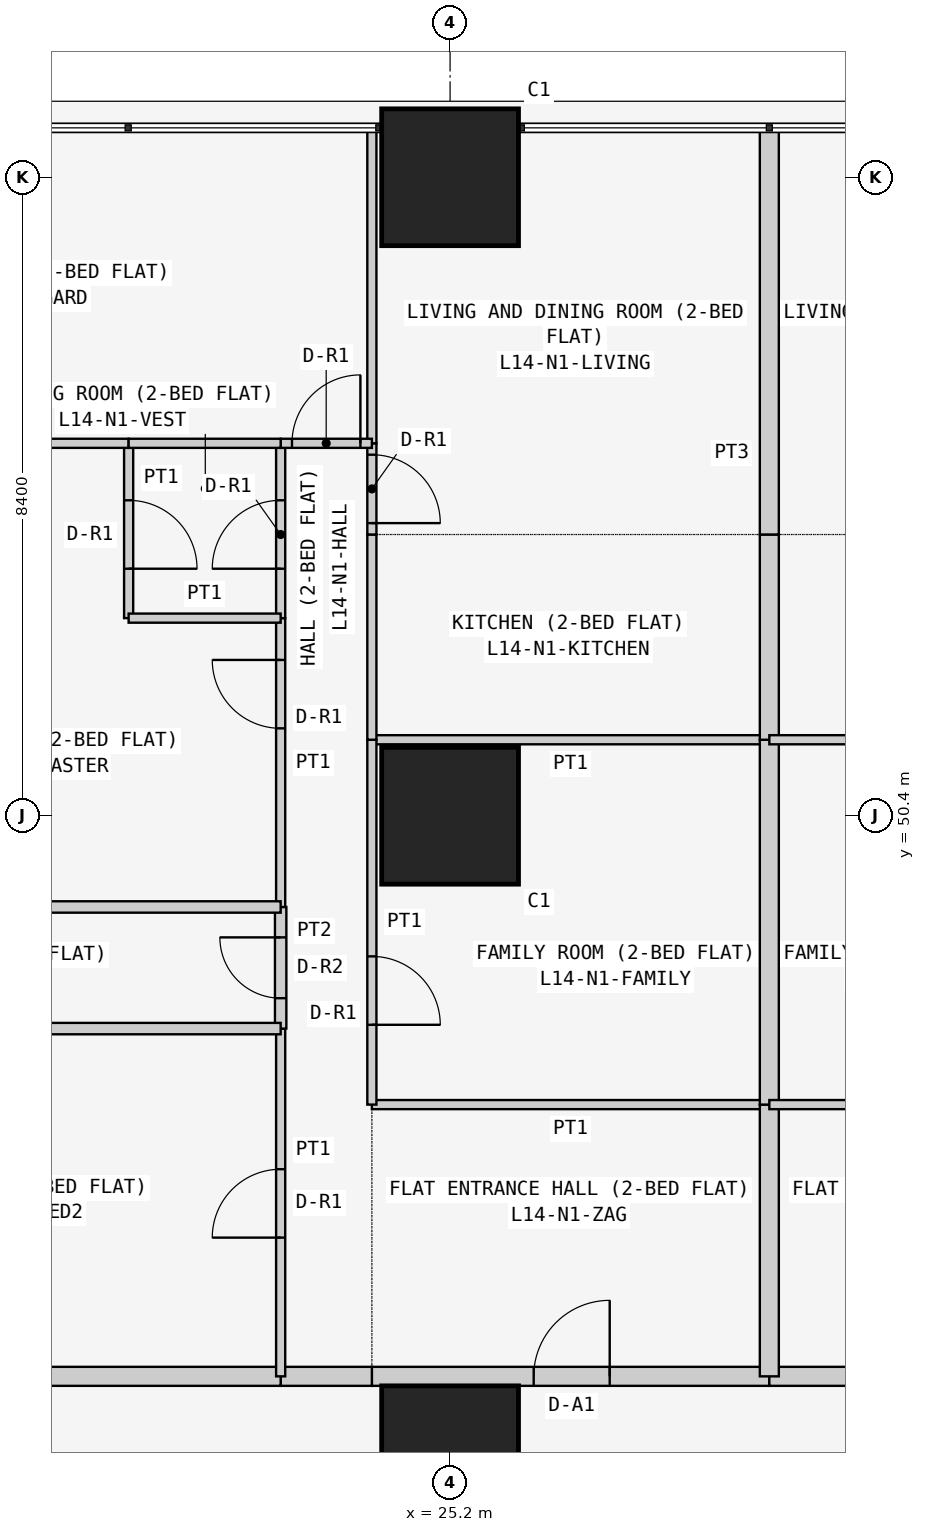
"""IFC4 building model, lengths in metres.
Left out: names, types, materials, properties, quantities, classifications, styles, units other than length and angle.
Written with IfcOpenShell. Run it as: python <this file> out.ifc"""

import sys

from ifc_helpers import new_model, si_unit, direction, frame, frame_2d, origin, origin_2d, place, context, subcontext, project, spatial, rectangle, extrude, element, fill, save


model = new_model("IFC4")
c1 = context("Model", 3, precision=1e-05, world=origin(), true_north=direction((0.0, 1.0)))
c2 = subcontext(c1, "Body", "Model", "MODEL_VIEW")
j1 = project(units=[si_unit("LENGTHUNIT", "METRE"), si_unit("PLANEANGLEUNIT", "RADIAN")], contexts=[c1])
p1 = place(None, origin())
s1 = spatial("IfcSite", under=j1, at=p1, CompositionType="ELEMENT")
p2 = place(p1, origin())
s2 = spatial("IfcBuilding", under=s1, at=p2, CompositionType="ELEMENT")
p3 = place(p2, frame((0.0, 0.0, 59.7)))
s3 = spatial("IfcBuildingStorey", under=s2, at=p3, CompositionType="ELEMENT", Elevation=59.7)
for number, where, z_axis, x_axis in (
    (1, (25.2, 42.0, 0.0), (0.0, 0.0, 1.0), (1.0, 0.0, 0.0)),
    (2, (25.2, 50.4, 0.0), (0.0, 0.0, 1.0), (1.0, 0.0, 0.0)),
    (3, (25.2, 58.8, 0.0), (0.0, 0.0, 1.0), (1.0, 0.0, 0.0)),
):
    element("IfcColumn", number, at=place(p3, frame(where, z_axis=z_axis, x_axis=x_axis)), inside=s3, PredefinedType="COLUMN", context=c2, shape_type="SweptSolid", body=[
        extrude(rectangle(XDim=1.8, YDim=1.8, at=origin_2d()), origin(), (0.0, 0.0, 1.0), 3.6),
    ])
p4 = place(p3, frame((24.171, 43.025, 0.0), z_axis=(0.0, 0.0, 1.0), x_axis=(1.0, 0.0, 0.0)))
e4 = element("IfcWall", 4, at=p4, inside=s3, PredefinedType="PARTITIONING", context=c2, shape_type="SweptSolid", body=[
    extrude(rectangle(XDim=5.229, YDim=0.25, at=frame_2d((2.615, 0.0))), origin(), (0.0, 0.0, 1.0), 3.45),
])
p5 = place(p4, frame((2.129, 0.0, 0.0)))
e5 = element("IfcOpeningElement", 5, at=p5, cuts=e4, PredefinedType="OPENING", context=c2, shape_type="SweptSolid", body=[
    extrude(rectangle(XDim=1.0, YDim=2.1, at=frame_2d((0.5, 1.05))), frame((0.0, 0.135, 0.0), z_axis=(0.0, -1.0, 0.0), x_axis=(1.0, 0.0, 0.0)), (0.0, 0.0, 1.0), 0.27),
])
p6 = place(p3, frame((22.971, 43.025, 0.0), z_axis=(0.0, 0.0, 1.0), x_axis=(1.0, 0.0, 0.0)))
e6 = element("IfcWall", 6, at=p6, inside=s3, PredefinedType="PARTITIONING", context=c2, shape_type="SweptSolid", body=[
    extrude(rectangle(XDim=1.2, YDim=0.25, at=frame_2d((0.6, 0.0))), origin(), (0.0, 0.0, 1.0), 3.45),
])
p7 = place(p3, frame((16.1, 43.025, 0.0), z_axis=(0.0, 0.0, 1.0), x_axis=(1.0, 0.0, 0.0)))
e7 = element("IfcWall", 7, at=p7, inside=s3, PredefinedType="PARTITIONING", context=c2, shape_type="SweptSolid", body=[
    extrude(rectangle(XDim=6.871, YDim=0.25, at=frame_2d((3.436, 0.0))), origin(), (0.0, 0.0, 1.0), 3.45),
])
p8 = place(p3, frame((29.4, 43.025, 0.0), z_axis=(0.0, 0.0, 1.0), x_axis=(1.0, 0.0, 0.0)))
e8 = element("IfcWall", 8, at=p8, inside=s3, PredefinedType="PARTITIONING", context=c2, shape_type="SweptSolid", body=[
    extrude(rectangle(XDim=5.229, YDim=0.25, at=frame_2d((2.615, 0.0))), origin(), (0.0, 0.0, 1.0), 3.45),
])
p9 = place(p8, frame((2.1, 0.0, 0.0)))
e9 = element("IfcOpeningElement", 9, at=p9, cuts=e8, PredefinedType="OPENING", context=c2, shape_type="SweptSolid", body=[
    extrude(rectangle(XDim=1.0, YDim=2.1, at=frame_2d((0.5, 1.05))), frame((0.0, 0.135, 0.0), z_axis=(0.0, -1.0, 0.0), x_axis=(1.0, 0.0, 0.0)), (0.0, 0.0, 1.0), 0.27),
])
p10 = place(p3, frame((29.4, 46.6, 0.0), z_axis=(0.0, 0.0, 1.0), x_axis=(-1.0, 0.0, 0.0)))
e10 = element("IfcWall", 10, at=p10, inside=s3, PredefinedType="PARTITIONING", context=c2, shape_type="SweptSolid", body=[
    extrude(rectangle(XDim=5.229, YDim=0.12, at=frame_2d((2.615, 0.0))), origin(), (0.0, 0.0, 1.0), 3.45),
])
p11 = place(p3, frame((29.4, 43.025, 0.0), z_axis=(0.0, 0.0, 1.0), x_axis=(0.0, 1.0, 0.0)))
e11 = element("IfcWall", 11, at=p11, inside=s3, PredefinedType="PARTITIONING", context=c2, shape_type="SweptSolid", body=[
    extrude(rectangle(XDim=3.575, YDim=0.25, at=frame_2d((1.788, 0.0))), origin(), (0.0, 0.0, 1.0), 2.848),
])
p12 = place(p3, frame((29.4, 51.4, 0.0), z_axis=(0.0, 0.0, 1.0), x_axis=(-1.0, 0.0, 0.0)))
e12 = element("IfcWall", 12, at=p12, inside=s3, PredefinedType="PARTITIONING", context=c2, shape_type="SweptSolid", body=[
    extrude(rectangle(XDim=5.229, YDim=0.12, at=frame_2d((2.615, 0.0))), origin(), (0.0, 0.0, 1.0), 3.45),
])
p13 = place(p3, frame((24.171, 51.4, 0.0), z_axis=(0.0, 0.0, 1.0), x_axis=(0.0, -1.0, 0.0)))
e13 = element("IfcWall", 13, at=p13, inside=s3, PredefinedType="PARTITIONING", context=c2, shape_type="SweptSolid", body=[
    extrude(rectangle(XDim=4.8, YDim=0.12, at=frame_2d((2.4, 0.0))), origin(), (0.0, 0.0, 1.0), 3.45),
])
p14 = place(p13, frame((2.85, 0.0, 0.0)))
e14 = element("IfcOpeningElement", 14, at=p14, cuts=e13, PredefinedType="OPENING", context=c2, shape_type="SweptSolid", body=[
    extrude(rectangle(XDim=0.9, YDim=2.1, at=frame_2d((0.45, 1.05))), frame((0.0, 0.07, 0.0), z_axis=(0.0, -1.0, 0.0), x_axis=(1.0, 0.0, 0.0)), (0.0, 0.0, 1.0), 0.14),
])
p15 = place(p3, frame((29.4, 46.6, 0.0), z_axis=(0.0, 0.0, 1.0), x_axis=(0.0, 1.0, 0.0)))
e15 = element("IfcWall", 15, at=p15, inside=s3, PredefinedType="PARTITIONING", context=c2, shape_type="SweptSolid", body=[
    extrude(rectangle(XDim=4.8, YDim=0.25, at=frame_2d((2.4, 0.0))), origin(), (0.0, 0.0, 1.0), 2.848),
])
p16 = place(p3, frame((24.171, 54.1, 0.0), z_axis=(0.0, 0.0, 1.0), x_axis=(0.0, -1.0, 0.0)))
e16 = element("IfcWall", 16, at=p16, inside=s3, PredefinedType="PARTITIONING", context=c2, shape_type="SweptSolid", body=[
    extrude(rectangle(XDim=2.7, YDim=0.12, at=frame_2d((1.35, 0.0))), origin(), (0.0, 0.0, 1.0), 3.45),
])
p17 = place(p3, frame((29.4, 51.4, 0.0), z_axis=(0.0, 0.0, 1.0), x_axis=(0.0, 1.0, 0.0)))
e17 = element("IfcWall", 17, at=p17, inside=s3, PredefinedType="PARTITIONING", context=c2, shape_type="SweptSolid", body=[
    extrude(rectangle(XDim=2.7, YDim=0.25, at=frame_2d((1.35, 0.0))), origin(), (0.0, 0.0, 1.0), 2.848),
])
p18 = place(p3, frame((24.171, 55.3, 0.0), z_axis=(0.0, 0.0, 1.0), x_axis=(0.0, -1.0, 0.0)))
e18 = element("IfcWall", 18, at=p18, inside=s3, PredefinedType="PARTITIONING", context=c2, shape_type="SweptSolid", body=[
    extrude(rectangle(XDim=1.2, YDim=0.12, at=frame_2d((0.6, 0.0))), origin(), (0.0, 0.0, 1.0), 3.45),
])
p19 = place(p18, frame((0.15, 0.0, 0.0)))
e19 = element("IfcOpeningElement", 19, at=p19, cuts=e18, PredefinedType="OPENING", context=c2, shape_type="SweptSolid", body=[
    extrude(rectangle(XDim=0.9, YDim=2.1, at=frame_2d((0.45, 1.05))), frame((0.0, 0.07, 0.0), z_axis=(0.0, -1.0, 0.0), x_axis=(1.0, 0.0, 0.0)), (0.0, 0.0, 1.0), 0.14),
])
p20 = place(p3, frame((24.171, 59.45, 0.0), z_axis=(0.0, 0.0, 1.0), x_axis=(0.0, -1.0, 0.0)))
e20 = element("IfcWall", 20, at=p20, inside=s3, PredefinedType="PARTITIONING", context=c2, shape_type="SweptSolid", body=[
    extrude(rectangle(XDim=4.15, YDim=0.12, at=frame_2d((2.075, 0.0))), origin(), (0.0, 0.0, 1.0), 3.45),
])
p21 = place(p3, frame((29.4, 54.1, 0.0), z_axis=(0.0, 0.0, 1.0), x_axis=(0.0, 1.0, 0.0)))
e21 = element("IfcWall", 21, at=p21, inside=s3, PredefinedType="PARTITIONING", context=c2, shape_type="SweptSolid", body=[
    extrude(rectangle(XDim=5.35, YDim=0.25, at=frame_2d((2.675, 0.0))), origin(), (0.0, 0.0, 1.0), 2.848),
])
p22 = place(p3, frame((22.971, 47.6, 0.0), z_axis=(0.0, 0.0, 1.0), x_axis=(0.0, -1.0, 0.0)))
e22 = element("IfcWall", 22, at=p22, inside=s3, PredefinedType="PARTITIONING", context=c2, shape_type="SweptSolid", body=[
    extrude(rectangle(XDim=4.575, YDim=0.12, at=frame_2d((2.288, 0.0))), origin(), (0.0, 0.0, 1.0), 3.45),
])
p23 = place(p22, frame((1.85, 0.0, 0.0)))
e23 = element("IfcOpeningElement", 23, at=p23, cuts=e22, PredefinedType="OPENING", context=c2, shape_type="SweptSolid", body=[
    extrude(rectangle(XDim=0.9, YDim=2.1, at=frame_2d((0.45, 1.05))), frame((0.0, 0.07, 0.0), z_axis=(0.0, -1.0, 0.0), x_axis=(1.0, 0.0, 0.0)), (0.0, 0.0, 1.0), 0.14),
])
p24 = place(p3, frame((22.971, 49.2, 0.0), z_axis=(0.0, 0.0, 1.0), x_axis=(0.0, -1.0, 0.0)))
e24 = element("IfcWall", 24, at=p24, inside=s3, PredefinedType="PARTITIONING", context=c2, shape_type="SweptSolid", body=[
    extrude(rectangle(XDim=1.6, YDim=0.15, at=frame_2d((0.8, 0.0))), origin(), (0.0, 0.0, 1.0), 3.45),
])
p25 = place(p24, frame((0.4, 0.0, 0.0)))
e25 = element("IfcOpeningElement", 25, at=p25, cuts=e24, PredefinedType="OPENING", context=c2, shape_type="SweptSolid", body=[
    extrude(rectangle(XDim=0.8, YDim=2.1, at=frame_2d((0.4, 1.05))), frame((0.0, 0.085, 0.0), z_axis=(0.0, -1.0, 0.0), x_axis=(1.0, 0.0, 0.0)), (0.0, 0.0, 1.0), 0.17),
])
p26 = place(p3, frame((22.971, 53.0, 0.0), z_axis=(0.0, 0.0, 1.0), x_axis=(0.0, -1.0, 0.0)))
e26 = element("IfcWall", 26, at=p26, inside=s3, PredefinedType="PARTITIONING", context=c2, shape_type="SweptSolid", body=[
    extrude(rectangle(XDim=3.8, YDim=0.12, at=frame_2d((1.9, 0.0))), origin(), (0.0, 0.0, 1.0), 3.45),
])
p27 = place(p26, frame((0.55, 0.0, 0.0)))
e27 = element("IfcOpeningElement", 27, at=p27, cuts=e26, PredefinedType="OPENING", context=c2, shape_type="SweptSolid", body=[
    extrude(rectangle(XDim=0.9, YDim=2.1, at=frame_2d((0.45, 1.05))), frame((0.0, 0.07, 0.0), z_axis=(0.0, -1.0, 0.0), x_axis=(1.0, 0.0, 0.0)), (0.0, 0.0, 1.0), 0.14),
])
p28 = place(p3, frame((22.971, 55.3, 0.0), z_axis=(0.0, 0.0, 1.0), x_axis=(0.0, -1.0, 0.0)))
e28 = element("IfcWall", 28, at=p28, inside=s3, PredefinedType="PARTITIONING", context=c2, shape_type="SweptSolid", body=[
    extrude(rectangle(XDim=2.3, YDim=0.12, at=frame_2d((1.15, 0.0))), origin(), (0.0, 0.0, 1.0), 3.45),
])
p29 = place(p28, frame((0.75, 0.0, 0.0)))
e29 = element("IfcOpeningElement", 29, at=p29, cuts=e28, PredefinedType="OPENING", context=c2, shape_type="SweptSolid", body=[
    extrude(rectangle(XDim=0.9, YDim=2.1, at=frame_2d((0.45, 1.05))), frame((0.0, 0.07, 0.0), z_axis=(0.0, -1.0, 0.0), x_axis=(1.0, 0.0, 0.0)), (0.0, 0.0, 1.0), 0.14),
])
p30 = place(p3, frame((24.171, 55.3, 0.0), z_axis=(0.0, 0.0, 1.0), x_axis=(-1.0, 0.0, 0.0)))
e30 = element("IfcWall", 30, at=p30, inside=s3, PredefinedType="PARTITIONING", context=c2, shape_type="SweptSolid", body=[
    extrude(rectangle(XDim=1.2, YDim=0.12, at=frame_2d((0.6, 0.0))), origin(), (0.0, 0.0, 1.0), 3.45),
])
p31 = place(p30, frame((0.151, 0.0, 0.0)))
e31 = element("IfcOpeningElement", 31, at=p31, cuts=e30, PredefinedType="OPENING", context=c2, shape_type="SweptSolid", body=[
    extrude(rectangle(XDim=0.9, YDim=2.1, at=frame_2d((0.45, 1.05))), frame((0.0, 0.07, 0.0), z_axis=(0.0, -1.0, 0.0), x_axis=(1.0, 0.0, 0.0)), (0.0, 0.0, 1.0), 0.14),
])
for number, where, z_axis, x_axis in (
    (32, (22.971, 47.6, 0.0), (0.0, 0.0, 1.0), (-1.0, 0.0, 0.0)),
    (33, (22.971, 49.2, 0.0), (0.0, 0.0, 1.0), (-1.0, 0.0, 0.0)),
):
    element("IfcWall", number, at=place(p3, frame(where, z_axis=z_axis, x_axis=x_axis)), inside=s3, PredefinedType="PARTITIONING", context=c2, shape_type="SweptSolid", body=[
        extrude(rectangle(XDim=6.871, YDim=0.15, at=frame_2d((3.436, 0.0))), origin(), (0.0, 0.0, 1.0), 3.45),
    ])
p32 = place(p3, frame((20.971, 55.3, 0.0), z_axis=(0.0, 0.0, 1.0), x_axis=(0.0, -1.0, 0.0)))
e34 = element("IfcWall", 34, at=p32, inside=s3, PredefinedType="PARTITIONING", context=c2, shape_type="SweptSolid", body=[
    extrude(rectangle(XDim=2.3, YDim=0.12, at=frame_2d((1.15, 0.0))), origin(), (0.0, 0.0, 1.0), 2.848),
])
p33 = place(p32, frame((0.75, 0.0, 0.0)))
e35 = element("IfcOpeningElement", 35, at=p33, cuts=e34, PredefinedType="OPENING", context=c2, shape_type="SweptSolid", body=[
    extrude(rectangle(XDim=0.9, YDim=2.1, at=frame_2d((0.45, 1.05))), frame((0.0, 0.07, 0.0), z_axis=(0.0, -1.0, 0.0), x_axis=(1.0, 0.0, 0.0)), (0.0, 0.0, 1.0), 0.14),
])
p34 = place(p3, frame((20.971, 53.0, 0.0), z_axis=(0.0, 0.0, 1.0), x_axis=(1.0, 0.0, 0.0)))
e36 = element("IfcWall", 36, at=p34, inside=s3, PredefinedType="PARTITIONING", context=c2, shape_type="SweptSolid", body=[
    extrude(rectangle(XDim=2.0, YDim=0.12, at=frame_2d((1.0, 0.0))), origin(), (0.0, 0.0, 1.0), 3.45),
])
p35 = place(p3, frame((16.1, 55.3, 0.0), z_axis=(0.0, 0.0, 1.0), x_axis=(1.0, 0.0, 0.0)))
e37 = element("IfcWall", 37, at=p35, inside=s3, PredefinedType="PARTITIONING", context=c2, shape_type="SweptSolid", body=[
    extrude(rectangle(XDim=4.871, YDim=0.12, at=frame_2d((2.436, 0.0))), origin(), (0.0, 0.0, 1.0), 3.45),
])
p36 = place(p3, frame((22.971, 55.3, 0.0), z_axis=(0.0, 0.0, 1.0), x_axis=(-1.0, 0.0, 0.0)))
e38 = element("IfcWall", 38, at=p36, inside=s3, PredefinedType="PARTITIONING", context=c2, shape_type="SweptSolid", body=[
    extrude(rectangle(XDim=2.0, YDim=0.12, at=frame_2d((1.0, 0.0))), origin(), (0.0, 0.0, 1.0), 3.45),
])
for number, where, z_axis, x_axis in (
    (39, (29.4, 46.6, 0.0), (0.0, 0.0, 1.0), (1.0, 0.0, 0.0)),
    (40, (29.4, 51.4, 0.0), (0.0, 0.0, 1.0), (1.0, 0.0, 0.0)),
):
    element("IfcWall", number, at=place(p3, frame(where, z_axis=z_axis, x_axis=x_axis)), inside=s3, PredefinedType="PARTITIONING", context=c2, shape_type="SweptSolid", body=[
        extrude(rectangle(XDim=5.229, YDim=0.12, at=frame_2d((2.615, 0.0))), origin(), (0.0, 0.0, 1.0), 3.45),
    ])
p37 = place(p5, origin())
e41 = element("IfcDoor", 41, at=p37, inside=s3, OperationType="SINGLE_SWING_RIGHT", PredefinedType="DOOR", context=c2, shape_type="SweptSolid", body=[
    extrude(rectangle(XDim=1.0, YDim=2.1, at=frame_2d((0.5, 1.05))), frame((0.0, 0.025, 0.0), z_axis=(0.0, -1.0, 0.0), x_axis=(1.0, 0.0, 0.0)), (0.0, 0.0, 1.0), 0.05),
])
fill(e5, e41)
p38 = place(p14, origin())
e42 = element("IfcDoor", 42, at=p38, inside=s3, OperationType="SINGLE_SWING_RIGHT", PredefinedType="DOOR", context=c2, shape_type="SweptSolid", body=[
    extrude(rectangle(XDim=0.9, YDim=2.1, at=frame_2d((0.45, 1.05))), frame((0.0, 0.025, 0.0), z_axis=(0.0, -1.0, 0.0), x_axis=(1.0, 0.0, 0.0)), (0.0, 0.0, 1.0), 0.05),
])
fill(e14, e42)
p39 = place(p19, origin())
e43 = element("IfcDoor", 43, at=p39, inside=s3, OperationType="SINGLE_SWING_RIGHT", PredefinedType="DOOR", context=c2, shape_type="SweptSolid", body=[
    extrude(rectangle(XDim=0.9, YDim=2.1, at=frame_2d((0.45, 1.05))), frame((0.0, 0.025, 0.0), z_axis=(0.0, -1.0, 0.0), x_axis=(1.0, 0.0, 0.0)), (0.0, 0.0, 1.0), 0.05),
])
fill(e19, e43)
p40 = place(p23, frame((0.9, 0.0, 0.0), z_axis=(0.0, 0.0, 1.0), x_axis=(-1.0, 0.0, 0.0)))
e44 = element("IfcDoor", 44, at=p40, inside=s3, OperationType="SINGLE_SWING_LEFT", PredefinedType="DOOR", context=c2, shape_type="SweptSolid", body=[
    extrude(rectangle(XDim=0.9, YDim=2.1, at=frame_2d((0.45, 1.05))), frame((0.0, 0.025, 0.0), z_axis=(0.0, -1.0, 0.0), x_axis=(1.0, 0.0, 0.0)), (0.0, 0.0, 1.0), 0.05),
])
fill(e23, e44)
p41 = place(p25, frame((0.8, 0.0, 0.0), z_axis=(0.0, 0.0, 1.0), x_axis=(-1.0, 0.0, 0.0)))
e45 = element("IfcDoor", 45, at=p41, inside=s3, OperationType="SINGLE_SWING_RIGHT", PredefinedType="DOOR", context=c2, shape_type="SweptSolid", body=[
    extrude(rectangle(XDim=0.8, YDim=2.1, at=frame_2d((0.4, 1.05))), frame((0.0, 0.025, 0.0), z_axis=(0.0, -1.0, 0.0), x_axis=(1.0, 0.0, 0.0)), (0.0, 0.0, 1.0), 0.05),
])
fill(e25, e45)
p42 = place(p27, frame((0.9, 0.0, 0.0), z_axis=(0.0, 0.0, 1.0), x_axis=(-1.0, 0.0, 0.0)))
e46 = element("IfcDoor", 46, at=p42, inside=s3, OperationType="SINGLE_SWING_RIGHT", PredefinedType="DOOR", context=c2, shape_type="SweptSolid", body=[
    extrude(rectangle(XDim=0.9, YDim=2.1, at=frame_2d((0.45, 1.05))), frame((0.0, 0.025, 0.0), z_axis=(0.0, -1.0, 0.0), x_axis=(1.0, 0.0, 0.0)), (0.0, 0.0, 1.0), 0.05),
])
fill(e27, e46)
p43 = place(p29, frame((0.9, 0.0, 0.0), z_axis=(0.0, 0.0, 1.0), x_axis=(-1.0, 0.0, 0.0)))
e47 = element("IfcDoor", 47, at=p43, inside=s3, OperationType="SINGLE_SWING_LEFT", PredefinedType="DOOR", context=c2, shape_type="SweptSolid", body=[
    extrude(rectangle(XDim=0.9, YDim=2.1, at=frame_2d((0.45, 1.05))), frame((0.0, 0.025, 0.0), z_axis=(0.0, -1.0, 0.0), x_axis=(1.0, 0.0, 0.0)), (0.0, 0.0, 1.0), 0.05),
])
fill(e29, e47)
p44 = place(p33, origin())
e48 = element("IfcDoor", 48, at=p44, inside=s3, OperationType="SINGLE_SWING_RIGHT", PredefinedType="DOOR", context=c2, shape_type="SweptSolid", body=[
    extrude(rectangle(XDim=0.9, YDim=2.1, at=frame_2d((0.45, 1.05))), frame((0.0, 0.025, 0.0), z_axis=(0.0, -1.0, 0.0), x_axis=(1.0, 0.0, 0.0)), (0.0, 0.0, 1.0), 0.05),
])
fill(e35, e48)
p45 = place(p31, frame((0.9, 0.0, 0.0), z_axis=(0.0, 0.0, 1.0), x_axis=(-1.0, 0.0, 0.0)))
e49 = element("IfcDoor", 49, at=p45, inside=s3, OperationType="SINGLE_SWING_RIGHT", PredefinedType="DOOR", context=c2, shape_type="SweptSolid", body=[
    extrude(rectangle(XDim=0.9, YDim=2.1, at=frame_2d((0.45, 1.05))), frame((0.0, 0.025, 0.0), z_axis=(0.0, -1.0, 0.0), x_axis=(1.0, 0.0, 0.0)), (0.0, 0.0, 1.0), 0.05),
])
fill(e31, e49)
save(model, sys.argv[1])
